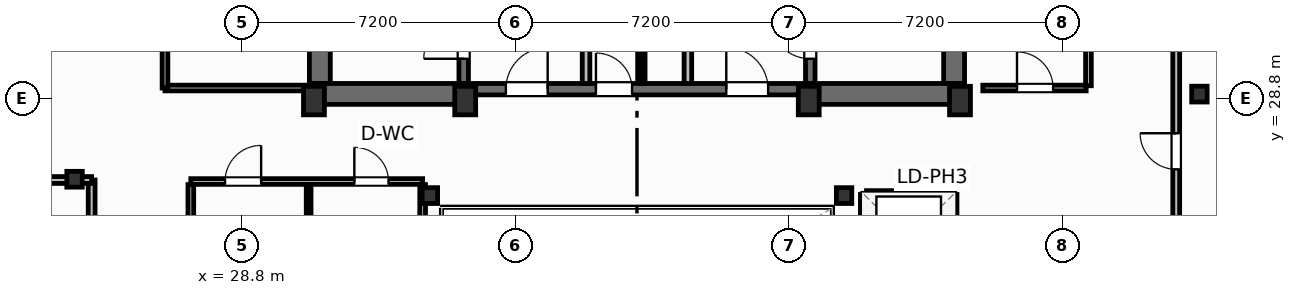
"""IFC4 building model, lengths in metres.
Left out: names, types, materials, properties, quantities, classifications, styles, units other than length and angle.
Written with IfcOpenShell. Run it as: python <this file> out.ifc"""

import sys

from ifc_helpers import new_model, si_unit, direction, frame, frame_2d, origin, origin_2d, place, context, subcontext, project, spatial, rectangle, i_section, extrude, element, fill, save


model = new_model("IFC4")
c1 = context("Model", 3, precision=1e-05, world=origin(), true_north=direction((0.0, 1.0)))
c2 = subcontext(c1, "Body", "Model", "MODEL_VIEW")
j1 = project(units=[si_unit("LENGTHUNIT", "METRE"), si_unit("PLANEANGLEUNIT", "RADIAN")], contexts=[c1])
p1 = place(None, origin())
s1 = spatial("IfcSite", under=j1, at=p1, CompositionType="ELEMENT")
p2 = place(p1, origin())
s2 = spatial("IfcBuilding", under=s1, at=p2, CompositionType="ELEMENT")
p3 = place(p2, frame((0.0, 0.0, 261.9)))
s3 = spatial("IfcBuildingStorey", under=s2, at=p3, CompositionType="ELEMENT", Elevation=261.9)
for number, where, z_axis, x_axis in (
    (1, (30.7, 28.75, 0.0), (0.0, 0.0, 1.0), (1.0, 0.0, 0.0)),
    (2, (34.68, 28.75, 0.0), (0.0, 0.0, 1.0), (1.0, 0.0, 0.0)),
    (3, (43.72, 28.75, 0.0), (0.0, 0.0, 1.0), (1.0, 0.0, 0.0)),
    (4, (47.7, 28.75, 0.0), (0.0, 0.0, 1.0), (1.0, 0.0, 0.0)),
):
    element("IfcColumn", number, at=place(p3, frame(where, z_axis=z_axis, x_axis=x_axis)), inside=s3, PredefinedType="COLUMN", context=c2, shape_type="SweptSolid", body=[
        extrude(rectangle(XDim=0.55, YDim=0.75, at=origin_2d()), origin(), (0.0, 0.0, 1.0), 3.7),
    ])
for number, where, z_axis, x_axis in (
    (5, (33.75, 26.25, 0.0), (0.0, 0.0, 1.0), (1.0, 0.0, 0.0)),
    (6, (44.65, 26.25, 0.0), (0.0, 0.0, 1.0), (1.0, 0.0, 0.0)),
    (7, (24.4, 26.68, 0.0), (0.0, 0.0, 1.0), (1.0, 0.0, 0.0)),
    (8, (54.0, 28.92, 0.0), (0.0, 0.0, 1.0), (1.0, 0.0, 0.0)),
):
    element("IfcColumn", number, at=place(p3, frame(where, z_axis=z_axis, x_axis=x_axis)), inside=s3, PredefinedType="COLUMN", context=c2, shape_type="SweptSolid", body=[
        extrude(i_section(OverallWidth=0.406, OverallDepth=0.416, WebThickness=0.03, FlangeThickness=0.048, FilletRadius=0.025, at=origin_2d()), origin(), (0.0, 0.0, 1.0), 3.7),
    ])
for number, where, z_axis, x_axis in (
    (9, (30.855, 29.2, 0.0), (0.0, 0.0, 1.0), (0.0, 1.0, 0.0)),
    (10, (47.545, 29.2, 0.0), (0.0, 0.0, 1.0), (0.0, 1.0, 0.0)),
):
    element("IfcWall", number, at=place(p3, frame(where, z_axis=z_axis, x_axis=x_axis)), inside=s3, PredefinedType="SHEAR", context=c2, shape_type="SweptSolid", body=[
        extrude(rectangle(XDim=9.22, YDim=0.55, at=frame_2d((4.61, 0.0))), origin(), (0.0, 0.0, 1.0), 3.45),
    ])
for number, where, z_axis, x_axis in (
    (11, (30.58, 28.925, 0.0), (0.0, 0.0, 1.0), (1.0, 0.0, 0.0)),
    (12, (43.6, 28.925, 0.0), (0.0, 0.0, 1.0), (1.0, 0.0, 0.0)),
):
    element("IfcWall", number, at=place(p3, frame(where, z_axis=z_axis, x_axis=x_axis)), inside=s3, PredefinedType="SHEAR", context=c2, shape_type="SweptSolid", body=[
        extrude(rectangle(XDim=4.22, YDim=0.55, at=frame_2d((2.11, 0.0))), origin(), (0.0, 0.0, 1.0), 3.45),
    ])
p4 = place(p3, frame((34.8, 29.05, 0.0), z_axis=(0.0, 0.0, 1.0), x_axis=(1.0, 0.0, 0.0)))
e13 = element("IfcWall", 13, at=p4, inside=s3, PredefinedType="SHEAR", context=c2, shape_type="SweptSolid", body=[
    extrude(rectangle(XDim=8.8, YDim=0.3, at=frame_2d((4.4, 0.0))), origin(), (0.0, 0.0, 1.0), 3.45),
])
p5 = place(p4, frame((0.95, 0.0, 0.0)))
e14 = element("IfcOpeningElement", 14, at=p5, cuts=e13, PredefinedType="OPENING", context=c2, shape_type="SweptSolid", body=[
    extrude(rectangle(XDim=1.1, YDim=2.15, at=frame_2d((0.55, 1.075))), frame((0.0, 0.16, 0.0), z_axis=(0.0, -1.0, 0.0), x_axis=(1.0, 0.0, 0.0)), (0.0, 0.0, 1.0), 0.32),
])
p6 = place(p4, frame((6.75, 0.0, 0.0)))
e15 = element("IfcOpeningElement", 15, at=p6, cuts=e13, PredefinedType="OPENING", context=c2, shape_type="SweptSolid", body=[
    extrude(rectangle(XDim=1.1, YDim=2.15, at=frame_2d((0.55, 1.075))), frame((0.0, 0.16, 0.0), z_axis=(0.0, -1.0, 0.0), x_axis=(1.0, 0.0, 0.0)), (0.0, 0.0, 1.0), 0.32),
])
p7 = place(p4, frame((3.32, 0.0, 0.0)))
e16 = element("IfcOpeningElement", 16, at=p7, cuts=e13, PredefinedType="OPENING", context=c2, shape_type="SweptSolid", body=[
    extrude(rectangle(XDim=0.95, YDim=2.15, at=frame_2d((0.475, 1.075))), frame((0.0, 0.16, 0.0), z_axis=(0.0, -1.0, 0.0), x_axis=(1.0, 0.0, 0.0)), (0.0, 0.0, 1.0), 0.32),
])
p8 = place(p3, frame((34.64, 29.2, 0.0), z_axis=(0.0, 0.0, 1.0), x_axis=(0.0, 1.0, 0.0)))
e17 = element("IfcWall", 17, at=p8, inside=s3, PredefinedType="SHEAR", context=c2, shape_type="SweptSolid", body=[
    extrude(rectangle(XDim=9.22, YDim=0.25, at=frame_2d((4.61, 0.0))), origin(), (0.0, 0.0, 1.0), 3.45),
])
p9 = place(p8, frame((0.65, 0.0, 0.0)))
e18 = element("IfcOpeningElement", 18, at=p9, cuts=e17, PredefinedType="OPENING", context=c2, shape_type="SweptSolid", body=[
    extrude(rectangle(XDim=1.05, YDim=2.15, at=frame_2d((0.525, 1.075))), frame((0.0, 0.135, 0.0), z_axis=(0.0, -1.0, 0.0), x_axis=(1.0, 0.0, 0.0)), (0.0, 0.0, 1.0), 0.27),
])
p10 = place(p3, frame((43.76, 29.2, 0.0), z_axis=(0.0, 0.0, 1.0), x_axis=(0.0, 1.0, 0.0)))
e19 = element("IfcWall", 19, at=p10, inside=s3, PredefinedType="SHEAR", context=c2, shape_type="SweptSolid", body=[
    extrude(rectangle(XDim=9.22, YDim=0.25, at=frame_2d((4.61, 0.0))), origin(), (0.0, 0.0, 1.0), 3.45),
])
p11 = place(p10, frame((0.65, 0.0, 0.0)))
e20 = element("IfcOpeningElement", 20, at=p11, cuts=e19, PredefinedType="OPENING", context=c2, shape_type="SweptSolid", body=[
    extrude(rectangle(XDim=1.05, YDim=2.15, at=frame_2d((0.525, 1.075))), frame((0.0, 0.135, 0.0), z_axis=(0.0, -1.0, 0.0), x_axis=(1.0, 0.0, 0.0)), (0.0, 0.0, 1.0), 0.27),
])
p12 = place(p3, frame((24.85, 19.24, 0.0), z_axis=(0.0, 0.0, 1.0), x_axis=(0.0, 1.0, 0.0)))
e21 = element("IfcWall", 21, at=p12, inside=s3, PredefinedType="PARTITIONING", context=c2, shape_type="SweptSolid", body=[
    extrude(rectangle(XDim=7.42, YDim=0.18, at=frame_2d((3.71, 0.0))), origin(), (0.0, 0.0, 1.0), 3.45),
])
p13 = place(p12, frame((2.4, 0.0, 0.0)))
e22 = element("IfcOpeningElement", 22, at=p13, cuts=e21, PredefinedType="OPENING", context=c2, shape_type="SweptSolid", body=[
    extrude(rectangle(XDim=0.92, YDim=2.05, at=frame_2d((0.46, 1.025))), frame((0.0, 0.1, 0.0), z_axis=(0.0, -1.0, 0.0), x_axis=(1.0, 0.0, 0.0)), (0.0, 0.0, 1.0), 0.2),
])
p14 = place(p3, frame((5.107, 26.66, 0.0), z_axis=(0.0, 0.0, 1.0), x_axis=(1.0, 0.0, 0.0)))
e23 = element("IfcWall", 23, at=p14, inside=s3, PredefinedType="PARTITIONING", context=c2, shape_type="SweptSolid", body=[
    extrude(rectangle(XDim=19.743, YDim=0.18, at=frame_2d((9.872, 0.0))), origin(), (0.0, 0.0, 1.0), 2.662),
])
p15 = place(p3, frame((53.39, 19.24, 0.0), z_axis=(0.0, 0.0, 1.0), x_axis=(0.0, 1.0, 0.0)))
e24 = element("IfcWall", 24, at=p15, inside=s3, PredefinedType="PARTITIONING", context=c2, shape_type="SweptSolid", body=[
    extrude(rectangle(XDim=20.06, YDim=0.18, at=frame_2d((10.03, 0.0))), origin(), (0.0, 0.0, 1.0), 3.45),
])
p16 = place(p15, frame((7.7, 0.0, 0.0)))
e25 = element("IfcOpeningElement", 25, at=p16, cuts=e24, PredefinedType="OPENING", context=c2, shape_type="SweptSolid", body=[
    extrude(rectangle(XDim=0.95, YDim=2.05, at=frame_2d((0.475, 1.025))), frame((0.0, 0.1, 0.0), z_axis=(0.0, -1.0, 0.0), x_axis=(1.0, 0.0, 0.0)), (0.0, 0.0, 1.0), 0.2),
])
for number, where, z_axis, x_axis in (
    (26, (37.86, 29.2, 0.0), (0.0, 0.0, 1.0), (0.0, 1.0, 0.0)),
    (27, (40.54, 29.2, 0.0), (0.0, 0.0, 1.0), (0.0, 1.0, 0.0)),
):
    element("IfcWall", number, at=place(p3, frame(where, z_axis=z_axis, x_axis=x_axis)), inside=s3, PredefinedType="PARTITIONING", context=c2, shape_type="SweptSolid", body=[
        extrude(rectangle(XDim=5.18, YDim=0.2, at=frame_2d((2.59, 0.0))), origin(), (0.0, 0.0, 1.0), 3.45),
    ])
p17 = place(p3, frame((39.35, 29.2, 0.0), z_axis=(0.0, 0.0, 1.0), x_axis=(0.0, 1.0, 0.0)))
e28 = element("IfcWall", 28, at=p17, inside=s3, PredefinedType="PARTITIONING", context=c2, shape_type="SweptSolid", body=[
    extrude(rectangle(XDim=5.22, YDim=0.125, at=frame_2d((2.61, 0.0))), origin(), (0.0, 0.0, 1.0), 3.45),
])
p18 = place(p17, frame((2.05, 0.0, 0.0)))
e29 = element("IfcOpeningElement", 29, at=p18, cuts=e28, PredefinedType="OPENING", context=c2, shape_type="SweptSolid", body=[
    extrude(rectangle(XDim=0.85, YDim=2.05, at=frame_2d((0.425, 1.025))), frame((0.0, 0.073, 0.0), z_axis=(0.0, -1.0, 0.0), x_axis=(1.0, 0.0, 0.0)), (0.0, 0.0, 1.0), 0.145),
])
p19 = place(p3, frame((27.46, 26.62, 0.0), z_axis=(0.0, 0.0, 1.0), x_axis=(1.0, 0.0, 0.0)))
e30 = element("IfcWall", 30, at=p19, inside=s3, PredefinedType="PARTITIONING", context=c2, shape_type="SweptSolid", body=[
    extrude(rectangle(XDim=6.1, YDim=0.15, at=frame_2d((3.05, 0.0))), origin(), (0.0, 0.0, 1.0), 2.662),
])
p20 = place(p19, frame((0.9, 0.0, 0.0)))
e31 = element("IfcOpeningElement", 31, at=p20, cuts=e30, PredefinedType="OPENING", context=c2, shape_type="SweptSolid", body=[
    extrude(rectangle(XDim=0.95, YDim=2.05, at=frame_2d((0.475, 1.025))), frame((0.0, 0.085, 0.0), z_axis=(0.0, -1.0, 0.0), x_axis=(1.0, 0.0, 0.0)), (0.0, 0.0, 1.0), 0.17),
])
p21 = place(p19, frame((4.303, 0.0, 0.0)))
e32 = element("IfcOpeningElement", 32, at=p21, cuts=e30, PredefinedType="OPENING", context=c2, shape_type="SweptSolid", body=[
    extrude(rectangle(XDim=0.9, YDim=2.05, at=frame_2d((0.45, 1.025))), frame((0.0, 0.085, 0.0), z_axis=(0.0, -1.0, 0.0), x_axis=(1.0, 0.0, 0.0)), (0.0, 0.0, 1.0), 0.17),
])
p22 = place(p3, frame((30.56, 19.38, 0.0), z_axis=(0.0, 0.0, 1.0), x_axis=(0.0, 1.0, 0.0)))
e33 = element("IfcWall", 33, at=p22, inside=s3, PredefinedType="PARTITIONING", context=c2, shape_type="SweptSolid", body=[
    extrude(rectangle(XDim=7.16, YDim=0.125, at=frame_2d((3.58, 0.0))), origin(), (0.0, 0.0, 1.0), 3.45),
])
p23 = place(p22, frame((1.4, 0.0, 0.0)))
e34 = element("IfcOpeningElement", 34, at=p23, cuts=e33, PredefinedType="OPENING", context=c2, shape_type="SweptSolid", body=[
    extrude(rectangle(XDim=0.92, YDim=2.05, at=frame_2d((0.46, 1.025))), frame((0.0, 0.073, 0.0), z_axis=(0.0, -1.0, 0.0), x_axis=(1.0, 0.0, 0.0)), (0.0, 0.0, 1.0), 0.145),
])
p24 = place(p3, frame((27.46, 19.38, 0.0), z_axis=(0.0, 0.0, 1.0), x_axis=(0.0, 1.0, 0.0)))
e35 = element("IfcWall", 35, at=p24, inside=s3, PredefinedType="PARTITIONING", context=c2, shape_type="SweptSolid", body=[
    extrude(rectangle(XDim=7.16, YDim=0.15, at=frame_2d((3.58, 0.0))), origin(), (0.0, 0.0, 1.0), 3.45),
])
p25 = place(p3, frame((33.56, 19.38, 0.0), z_axis=(0.0, 0.0, 1.0), x_axis=(0.0, 1.0, 0.0)))
e36 = element("IfcWall", 36, at=p25, inside=s3, PredefinedType="PARTITIONING", context=c2, shape_type="SweptSolid", body=[
    extrude(rectangle(XDim=7.16, YDim=0.15, at=frame_2d((3.58, 0.0))), origin(), (0.0, 0.0, 1.0), 2.824),
])
p26 = place(p3, frame((26.78, 29.08, 0.0), z_axis=(0.0, 0.0, 1.0), x_axis=(1.0, 0.0, 0.0)))
e37 = element("IfcWall", 37, at=p26, inside=s3, PredefinedType="PARTITIONING", context=c2, shape_type="SweptSolid", body=[
    extrude(rectangle(XDim=3.8, YDim=0.15, at=frame_2d((1.9, 0.0))), origin(), (0.0, 0.0, 1.0), 3.45),
])
p27 = place(p3, frame((26.78, 29.08, 0.0), z_axis=(0.0, 0.0, 1.0), x_axis=(0.0, 1.0, 0.0)))
e38 = element("IfcWall", 38, at=p27, inside=s3, PredefinedType="PARTITIONING", context=c2, shape_type="SweptSolid", body=[
    extrude(rectangle(XDim=9.18, YDim=0.15, at=frame_2d((4.59, 0.0))), origin(), (0.0, 0.0, 1.0), 3.45),
])
p28 = place(p27, frame((2.4, 0.0, 0.0)))
e39 = element("IfcOpeningElement", 39, at=p28, cuts=e38, PredefinedType="OPENING", context=c2, shape_type="SweptSolid", body=[
    extrude(rectangle(XDim=0.95, YDim=2.05, at=frame_2d((0.475, 1.025))), frame((0.0, 0.085, 0.0), z_axis=(0.0, -1.0, 0.0), x_axis=(1.0, 0.0, 0.0)), (0.0, 0.0, 1.0), 0.17),
])
p29 = place(p3, frame((48.3, 29.08, 0.0), z_axis=(0.0, 0.0, 1.0), x_axis=(1.0, 0.0, 0.0)))
e40 = element("IfcWall", 40, at=p29, inside=s3, PredefinedType="PARTITIONING", context=c2, shape_type="SweptSolid", body=[
    extrude(rectangle(XDim=2.72, YDim=0.15, at=frame_2d((1.36, 0.0))), origin(), (0.0, 0.0, 1.0), 2.662),
])
p30 = place(p29, frame((0.9, 0.0, 0.0)))
e41 = element("IfcOpeningElement", 41, at=p30, cuts=e40, PredefinedType="OPENING", context=c2, shape_type="SweptSolid", body=[
    extrude(rectangle(XDim=0.95, YDim=2.05, at=frame_2d((0.475, 1.025))), frame((0.0, 0.085, 0.0), z_axis=(0.0, -1.0, 0.0), x_axis=(1.0, 0.0, 0.0)), (0.0, 0.0, 1.0), 0.17),
])
p31 = place(p3, frame((51.08, 29.14, 0.0), z_axis=(0.0, 0.0, 1.0), x_axis=(0.0, 1.0, 0.0)))
e42 = element("IfcWall", 42, at=p31, inside=s3, PredefinedType="PARTITIONING", context=c2, shape_type="SweptSolid", body=[
    extrude(rectangle(XDim=6.76, YDim=0.15, at=frame_2d((3.38, 0.0))), origin(), (0.0, 0.0, 1.0), 3.45),
])
p32 = place(p3, frame((45.24, 26.28, 0.0), z_axis=(0.0, 0.0, 1.0), x_axis=(1.0, 0.0, 0.0)))
e43 = element("IfcWall", 43, at=p32, inside=s3, PredefinedType="PARTITIONING", context=c2, shape_type="SweptSolid", body=[
    extrude(rectangle(XDim=2.22, YDim=0.2, at=frame_2d((1.11, 0.0))), origin(), (0.0, 0.0, 1.0), 3.45),
])
p33 = place(p3, frame((45.18, 19.38, 0.0), z_axis=(0.0, 0.0, 1.0), x_axis=(0.0, 1.0, 0.0)))
e44 = element("IfcWall", 44, at=p33, inside=s3, PredefinedType="PARTITIONING", context=c2, shape_type="SweptSolid", body=[
    extrude(rectangle(XDim=6.9, YDim=0.2, at=frame_2d((3.45, 0.0))), origin(), (0.0, 0.0, 1.0), 3.45),
])
p34 = place(p3, frame((47.52, 19.38, 0.0), z_axis=(0.0, 0.0, 1.0), x_axis=(0.0, 1.0, 0.0)))
e45 = element("IfcWall", 45, at=p34, inside=s3, PredefinedType="PARTITIONING", context=c2, shape_type="SweptSolid", body=[
    extrude(rectangle(XDim=6.9, YDim=0.2, at=frame_2d((3.45, 0.0))), origin(), (0.0, 0.0, 1.0), 3.45),
])
p35 = place(p34, frame((0.59, 0.0, 0.0)))
e46 = element("IfcOpeningElement", 46, at=p35, cuts=e45, PredefinedType="OPENING", context=c2, shape_type="SweptSolid", body=[
    extrude(rectangle(XDim=1.1, YDim=2.15, at=frame_2d((0.55, 1.075))), frame((0.0, 0.11, 0.0), z_axis=(0.0, -1.0, 0.0), x_axis=(1.0, 0.0, 0.0)), (0.0, 0.0, 1.0), 0.22),
])
p36 = place(p34, frame((2.89, 0.0, 0.0)))
e47 = element("IfcOpeningElement", 47, at=p36, cuts=e45, PredefinedType="OPENING", context=c2, shape_type="SweptSolid", body=[
    extrude(rectangle(XDim=1.1, YDim=2.15, at=frame_2d((0.55, 1.075))), frame((0.0, 0.11, 0.0), z_axis=(0.0, -1.0, 0.0), x_axis=(1.0, 0.0, 0.0)), (0.0, 0.0, 1.0), 0.22),
])
p37 = place(p34, frame((5.19, 0.0, 0.0)))
e48 = element("IfcOpeningElement", 48, at=p37, cuts=e45, PredefinedType="OPENING", context=c2, shape_type="SweptSolid", body=[
    extrude(rectangle(XDim=1.1, YDim=2.15, at=frame_2d((0.55, 1.075))), frame((0.0, 0.11, 0.0), z_axis=(0.0, -1.0, 0.0), x_axis=(1.0, 0.0, 0.0)), (0.0, 0.0, 1.0), 0.22),
])
p38 = place(p16, origin())
e49 = element("IfcDoor", 49, at=p38, inside=s3, OperationType="SINGLE_SWING_RIGHT", PredefinedType="DOOR", context=c2, shape_type="SweptSolid", body=[
    extrude(rectangle(XDim=0.95, YDim=2.05, at=frame_2d((0.475, 1.025))), frame((0.0, 0.025, 0.0), z_axis=(0.0, -1.0, 0.0), x_axis=(1.0, 0.0, 0.0)), (0.0, 0.0, 1.0), 0.05),
])
fill(e25, e49)
p39 = place(p9, origin())
e50 = element("IfcDoor", 50, at=p39, inside=s3, OperationType="SINGLE_SWING_LEFT", PredefinedType="DOOR", context=c2, shape_type="SweptSolid", body=[
    extrude(rectangle(XDim=1.05, YDim=2.15, at=frame_2d((0.525, 1.075))), frame((0.0, 0.025, 0.0), z_axis=(0.0, -1.0, 0.0), x_axis=(1.0, 0.0, 0.0)), (0.0, 0.0, 1.0), 0.05),
])
fill(e18, e50)
p40 = place(p11, origin())
e51 = element("IfcDoor", 51, at=p40, inside=s3, OperationType="SINGLE_SWING_RIGHT", PredefinedType="DOOR", context=c2, shape_type="SweptSolid", body=[
    extrude(rectangle(XDim=1.05, YDim=2.15, at=frame_2d((0.525, 1.075))), frame((0.0, 0.025, 0.0), z_axis=(0.0, -1.0, 0.0), x_axis=(1.0, 0.0, 0.0)), (0.0, 0.0, 1.0), 0.05),
])
fill(e20, e51)
p41 = place(p5, origin())
e52 = element("IfcDoor", 52, at=p41, inside=s3, OperationType="SINGLE_SWING_RIGHT", PredefinedType="DOOR", context=c2, shape_type="SweptSolid", body=[
    extrude(rectangle(XDim=1.1, YDim=2.15, at=frame_2d((0.55, 1.075))), frame((0.0, 0.025, 0.0), z_axis=(0.0, -1.0, 0.0), x_axis=(1.0, 0.0, 0.0)), (0.0, 0.0, 1.0), 0.05),
])
fill(e14, e52)
p42 = place(p6, origin())
e53 = element("IfcDoor", 53, at=p42, inside=s3, OperationType="SINGLE_SWING_LEFT", PredefinedType="DOOR", context=c2, shape_type="SweptSolid", body=[
    extrude(rectangle(XDim=1.1, YDim=2.15, at=frame_2d((0.55, 1.075))), frame((0.0, 0.025, 0.0), z_axis=(0.0, -1.0, 0.0), x_axis=(1.0, 0.0, 0.0)), (0.0, 0.0, 1.0), 0.05),
])
fill(e15, e53)
p43 = place(p7, origin())
e54 = element("IfcDoor", 54, at=p43, inside=s3, OperationType="SINGLE_SWING_LEFT", PredefinedType="DOOR", context=c2, shape_type="SweptSolid", body=[
    extrude(rectangle(XDim=0.95, YDim=2.15, at=frame_2d((0.475, 1.075))), frame((0.0, 0.025, 0.0), z_axis=(0.0, -1.0, 0.0), x_axis=(1.0, 0.0, 0.0)), (0.0, 0.0, 1.0), 0.05),
])
fill(e16, e54)
p44 = place(p20, origin())
e55 = element("IfcDoor", 55, at=p44, inside=s3, OperationType="SINGLE_SWING_RIGHT", PredefinedType="DOOR", context=c2, shape_type="SweptSolid", body=[
    extrude(rectangle(XDim=0.95, YDim=2.05, at=frame_2d((0.475, 1.025))), frame((0.0, 0.025, 0.0), z_axis=(0.0, -1.0, 0.0), x_axis=(1.0, 0.0, 0.0)), (0.0, 0.0, 1.0), 0.05),
])
fill(e31, e55)
p45 = place(p21, origin())
e56 = element("IfcDoor", 56, at=p45, inside=s3, OperationType="SINGLE_SWING_LEFT", PredefinedType="DOOR", context=c2, shape_type="SweptSolid", body=[
    extrude(rectangle(XDim=0.9, YDim=2.05, at=frame_2d((0.45, 1.025))), frame((0.0, 0.025, 0.0), z_axis=(0.0, -1.0, 0.0), x_axis=(1.0, 0.0, 0.0)), (0.0, 0.0, 1.0), 0.05),
])
fill(e32, e56)
p46 = place(p30, origin())
e57 = element("IfcDoor", 57, at=p46, inside=s3, OperationType="SINGLE_SWING_LEFT", PredefinedType="DOOR", context=c2, shape_type="SweptSolid", body=[
    extrude(rectangle(XDim=0.95, YDim=2.05, at=frame_2d((0.475, 1.025))), frame((0.0, 0.025, 0.0), z_axis=(0.0, -1.0, 0.0), x_axis=(1.0, 0.0, 0.0)), (0.0, 0.0, 1.0), 0.05),
])
fill(e41, e57)
save(model, sys.argv[1])
